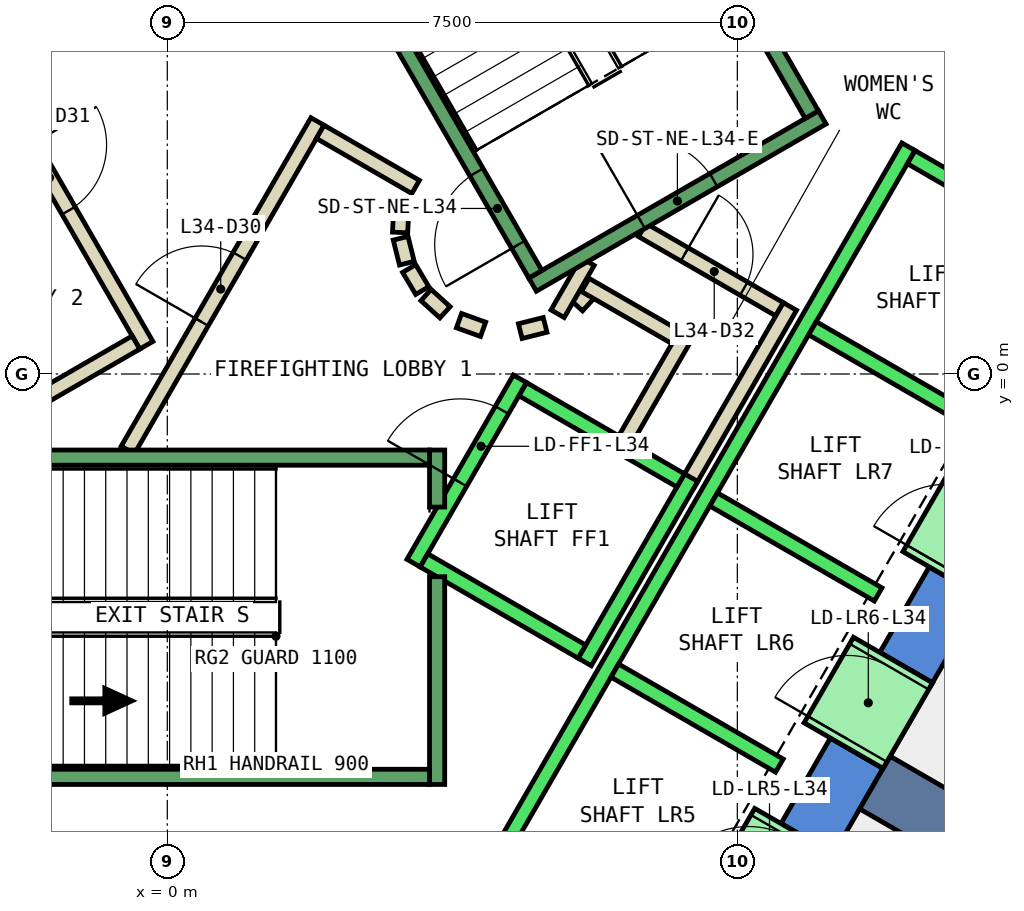
"""IFC4 building model, lengths in metres.
Left out: names, types, materials, properties, quantities, classifications, styles, units other than length and angle.
Written with IfcOpenShell. Run it as: python <this file> out.ifc"""

import sys

from ifc_helpers import new_model, si_unit, direction, frame, frame_2d, origin, place, context, subcontext, project, spatial, polyline, rectangle, outline, extrude, element, fill, save


model = new_model("IFC4")
c1 = context("Model", 3, precision=1e-05, world=origin(), true_north=direction((0.0, 1.0)))
c2 = subcontext(c1, "Body", "Model", "MODEL_VIEW")
j1 = project(units=[si_unit("LENGTHUNIT", "METRE"), si_unit("PLANEANGLEUNIT", "RADIAN")], contexts=[c1])
p1 = place(None, origin())
s1 = spatial("IfcSite", under=j1, at=p1, CompositionType="ELEMENT")
p2 = place(p1, origin())
s2 = spatial("IfcBuilding", under=s1, at=p2, CompositionType="ELEMENT")
p3 = place(p2, frame((0.0, 0.0, 155.0)))
s3 = spatial("IfcBuildingStorey", under=s2, at=p3, CompositionType="ELEMENT", Elevation=155.0)
p4 = place(p3, frame((0.0, 0.0, -0.4)))
e1 = element("IfcWall", 1, at=p4, inside=s3, PredefinedType="SHEAR", context=c2, shape_type="SweptSolid", body=[
    extrude(outline(polyline([(8.517, 11.748), (7.824, 11.348), (12.933, 2.5), (13.856, 2.5), (8.517, 11.748)])), origin(), (0.0, 0.0, 1.0), 4.2),
])
p5 = place(p3, frame((0.0, 0.0, -0.4)))
e2 = element("IfcWall", 2, at=p5, inside=s3, PredefinedType="SHEAR", context=c2, shape_type="SweptSolid", body=[
    extrude(outline(polyline([(9.417, -5.189), (8.724, -4.789), (8.075, -5.914), (8.767, -6.314), (9.417, -5.189)])), origin(), (0.0, 0.0, 1.0), 4.2),
])
p6 = place(p3, frame((0.0, 0.0, -0.4)))
e3 = element("IfcWall", 3, at=p6, inside=s3, PredefinedType="SHEAR", context=c2, shape_type="SweptSolid", body=[
    extrude(outline(polyline([(10.717, -2.937), (10.025, -2.537), (9.374, -3.663), (10.067, -4.063), (10.717, -2.937)])), origin(), (0.0, 0.0, 1.0), 4.2),
])
p7 = place(p3, frame((0.0, 0.0, 3.6)))
e4 = element("IfcWall", 4, at=p7, inside=s3, PredefinedType="SHEAR", context=c2, shape_type="SweptSolid", body=[
    extrude(outline(polyline([(8.767, -6.314), (8.075, -5.914), (7.424, -7.04), (8.117, -7.44), (8.767, -6.314)])), origin(), (0.0, 0.0, 1.0), 0.2),
])
p8 = place(p3, frame((0.0, 0.0, 3.6)))
e5 = element("IfcWall", 5, at=p8, inside=s3, PredefinedType="SHEAR", context=c2, shape_type="SweptSolid", body=[
    extrude(outline(polyline([(10.067, -4.063), (9.374, -3.663), (8.724, -4.789), (9.417, -5.189), (10.067, -4.063)])), origin(), (0.0, 0.0, 1.0), 0.2),
])
p9 = place(p3, frame((0.0, 0.0, 3.6)))
e6 = element("IfcWall", 6, at=p9, inside=s3, PredefinedType="SHEAR", context=c2, shape_type="SweptSolid", body=[
    extrude(outline(polyline([(11.367, -1.811), (10.675, -1.411), (10.025, -2.537), (10.717, -2.937), (11.367, -1.811)])), origin(), (0.0, 0.0, 1.0), 0.2),
])
p10 = place(p3, frame((9.31, -5.375, -0.4), z_axis=(0.0, 0.0, 1.0), x_axis=(0.866017533419, -0.500013631625, 0.0)))
e7 = element("IfcWall", 7, at=p10, inside=s3, PredefinedType="SHEAR", context=c2, shape_type="SweptSolid", body=[
    extrude(rectangle(XDim=9.0, YDim=0.8, at=frame_2d((4.5, 0.0))), origin(), (0.0, 0.0, 1.0), 4.2),
])
p11 = place(p3, frame((5.39, 0.898, 0.0), z_axis=(0.0, 0.0, 1.0), x_axis=(0.673828488714, 0.738887791073, 0.0)))
e8 = element("IfcWall", 8, at=p11, inside=s3, PredefinedType="PARTITIONING", context=c2, shape_type="SweptSolid", body=[
    extrude(rectangle(XDim=0.263, YDim=0.2, at=frame_2d((0.131, 0.0))), origin(), (0.0, 0.0, 1.0), 3.8),
])
p12 = place(p3, frame((5.499, 1.172, 0.0), z_axis=(0.0, 0.0, 1.0), x_axis=(0.866333505267, -0.499465972466, 0.0)))
e9 = element("IfcWall", 9, at=p12, inside=s3, PredefinedType="PARTITIONING", context=c2, shape_type="SweptSolid", body=[
    extrude(rectangle(XDim=1.374, YDim=0.2, at=frame_2d((0.687, 0.0))), origin(), (0.0, 0.0, 1.0), 3.8),
])
p13 = place(p3, frame((6.826, 0.522, 0.0), z_axis=(0.0, 0.0, 1.0), x_axis=(-0.500016722714, -0.866015748706, 0.0)))
e10 = element("IfcWall", 10, at=p13, inside=s3, PredefinedType="PARTITIONING", context=c2, shape_type="SweptSolid", body=[
    extrude(rectangle(XDim=1.7, YDim=0.2, at=frame_2d((0.85, 0.0))), origin(), (0.0, 0.0, 1.0), 3.8),
])
p14 = place(p3, frame((6.25, 1.894, 0.0), z_axis=(0.0, 0.0, 1.0), x_axis=(0.866043184279, -0.499969202016, 0.0)))
e11 = element("IfcWall", 11, at=p14, inside=s3, PredefinedType="PARTITIONING", context=c2, shape_type="SweptSolid", body=[
    extrude(rectangle(XDim=2.084, YDim=0.2, at=frame_2d((1.042, 0.0))), origin(), (0.0, 0.0, 1.0), 3.8),
])
p15 = place(p14, frame((0.642, 0.0, 0.0)))
e12 = element("IfcOpeningElement", 12, at=p15, cuts=e11, PredefinedType="OPENING", context=c2, shape_type="SweptSolid", body=[
    extrude(rectangle(XDim=0.9, YDim=2.1, at=frame_2d((0.45, 1.05))), frame((0.0, 0.11, 0.0), z_axis=(0.0, -1.0, 0.0), x_axis=(1.0, 0.0, 0.0)), (0.0, 0.0, 1.0), 0.22),
])
p16 = place(p3, frame((8.192, 0.888, 0.0), z_axis=(0.0, 0.0, 1.0), x_axis=(-0.499940625693, -0.866059680843, 0.0)))
e13 = element("IfcWall", 13, at=p16, inside=s3, PredefinedType="PARTITIONING", context=c2, shape_type="SweptSolid", body=[
    extrude(rectangle(XDim=2.68, YDim=0.2, at=frame_2d((1.34, 0.0))), origin(), (0.0, 0.0, 1.0), 3.8),
])
p17 = place(p3, frame((5.135, 0.793, 0.0), z_axis=(0.0, 0.0, 1.0), x_axis=(0.499526442893, 0.866298639529, 0.0)))
e14 = element("IfcWall", 14, at=p17, inside=s3, PredefinedType="PARTITIONING", context=c2, shape_type="SweptSolid", body=[
    extrude(rectangle(XDim=0.791, YDim=0.2, at=frame_2d((0.396, 0.0))), origin(), (0.0, 0.0, 1.0), 3.8),
])
p18 = place(p3, frame((-0.52, -1.0, 0.0), z_axis=(0.0, 0.0, 1.0), x_axis=(0.50011622646, 0.865958290007, 0.0)))
e15 = element("IfcWall", 15, at=p18, inside=s3, PredefinedType="PARTITIONING", context=c2, shape_type="SweptSolid", body=[
    extrude(rectangle(XDim=4.991, YDim=0.2, at=frame_2d((2.496, 0.0))), origin(), (0.0, 0.0, 1.0), 3.8),
])
p19 = place(p18, frame((1.945, 0.0, 0.0)))
e16 = element("IfcOpeningElement", 16, at=p19, cuts=e15, PredefinedType="OPENING", context=c2, shape_type="SweptSolid", body=[
    extrude(rectangle(XDim=1.0, YDim=2.1, at=frame_2d((0.5, 1.05))), frame((0.0, 0.11, 0.0), z_axis=(0.0, -1.0, 0.0), x_axis=(1.0, 0.0, 0.0)), (0.0, 0.0, 1.0), 0.22),
])
p20 = place(p3, frame((2.012, 3.186, 0.0), z_axis=(0.0, 0.0, 1.0), x_axis=(0.865891012941, -0.500232699559, 0.0)))
e17 = element("IfcWall", 17, at=p20, inside=s3, PredefinedType="PARTITIONING", context=c2, shape_type="SweptSolid", body=[
    extrude(rectangle(XDim=1.449, YDim=0.2, at=frame_2d((0.725, 0.0))), origin(), (0.0, 0.0, 1.0), 3.8),
])
p21 = place(p3, frame((3.079, 2.199, 0.0), z_axis=(0.0, 0.0, 1.0), x_axis=(-0.047771483479, -0.998858290933, 0.0)))
e18 = element("IfcWall", 18, at=p21, inside=s3, PredefinedType="PARTITIONING", context=c2, shape_type="SweptSolid", body=[
    extrude(rectangle(XDim=0.337, YDim=0.2, at=frame_2d((0.169, 0.0))), origin(), (0.0, 0.0, 1.0), 3.8),
])
p22 = place(p3, frame((3.07, 1.786, 0.0), z_axis=(0.0, 0.0, 1.0), x_axis=(0.242705583207, -0.970099994784, 0.0)))
e19 = element("IfcWall", 19, at=p22, inside=s3, PredefinedType="PARTITIONING", context=c2, shape_type="SweptSolid", body=[
    extrude(rectangle(XDim=0.338, YDim=0.2, at=frame_2d((0.169, 0.0))), origin(), (0.0, 0.0, 1.0), 3.8),
])
for number, where, z_axis, x_axis in (
    (20, (3.182, 1.388, 0.0), (0.0, 0.0, 1.0), (0.512, -0.859, 0.0)),
    (21, (3.404, 1.039, 0.0), (0.0, 0.0, 1.0), (0.74, -0.672, 0.0)),
):
    element("IfcWall", number, at=place(p3, frame(where, z_axis=z_axis, x_axis=x_axis)), inside=s3, PredefinedType="PARTITIONING", context=c2, shape_type="SweptSolid", body=[
        extrude(rectangle(XDim=0.338, YDim=0.2, at=frame_2d((0.169, 0.0))), origin(), (0.0, 0.0, 1.0), 3.8),
    ])
p23 = place(p3, frame((3.838, 0.702, 0.0), z_axis=(0.0, 0.0, 1.0), x_axis=(0.941035081519, -0.338308993895, 0.0)))
e22 = element("IfcWall", 22, at=p23, inside=s3, PredefinedType="PARTITIONING", context=c2, shape_type="SweptSolid", body=[
    extrude(rectangle(XDim=0.337, YDim=0.2, at=frame_2d((0.168, 0.0))), origin(), (0.0, 0.0, 1.0), 3.8),
])
p24 = place(p3, frame((4.644, 0.564, 0.0), z_axis=(0.0, 0.0, 1.0), x_axis=(0.969929076366, 0.243387729394, 0.0)))
e23 = element("IfcWall", 23, at=p24, inside=s3, PredefinedType="PARTITIONING", context=c2, shape_type="SweptSolid", body=[
    extrude(rectangle(XDim=0.337, YDim=0.2, at=frame_2d((0.168, 0.0))), origin(), (0.0, 0.0, 1.0), 3.8),
])
p25 = place(p3, frame((-2.771, 4.7, 0.0), z_axis=(0.0, 0.0, 1.0), x_axis=(0.499969479948, -0.866043023828, 0.0)))
e24 = element("IfcWall", 24, at=p25, inside=s3, PredefinedType="PARTITIONING", context=c2, shape_type="SweptSolid", body=[
    extrude(rectangle(XDim=4.99, YDim=0.2, at=frame_2d((2.495, 0.0))), origin(), (0.0, 0.0, 1.0), 3.8),
])
p26 = place(p25, frame((1.945, 0.0, 0.0)))
e25 = element("IfcOpeningElement", 25, at=p26, cuts=e24, PredefinedType="OPENING", context=c2, shape_type="SweptSolid", body=[
    extrude(rectangle(XDim=1.0, YDim=2.1, at=frame_2d((0.5, 1.05))), frame((0.0, 0.11, 0.0), z_axis=(0.0, -1.0, 0.0), x_axis=(1.0, 0.0, 0.0)), (0.0, 0.0, 1.0), 0.22),
])
p27 = place(p3, frame((-0.412, 0.414, 0.0), z_axis=(0.0, 0.0, 1.0), x_axis=(-0.866017369001, -0.500013916395, 0.0)))
e26 = element("IfcWall", 26, at=p27, inside=s3, PredefinedType="PARTITIONING", context=c2, shape_type="SweptSolid", body=[
    extrude(rectangle(XDim=1.45, YDim=0.2, at=frame_2d((0.725, 0.0))), origin(), (0.0, 0.0, 1.0), 3.8),
])
p28 = place(p3, frame((3.24, -2.488, 0.0), z_axis=(0.0, 0.0, 1.0), x_axis=(0.49994636267, 0.866056369097, 0.0)))
e27 = element("IfcWall", 27, at=p28, inside=s3, PredefinedType="STANDARD", context=c2, shape_type="SweptSolid", body=[
    extrude(rectangle(XDim=2.8, YDim=0.2, at=frame_2d((1.4, 0.0))), origin(), (0.0, 0.0, 1.0), 3.8),
])
p29 = place(p28, frame((1.225, 0.0, 0.0)))
e28 = element("IfcOpeningElement", 28, at=p29, cuts=e27, PredefinedType="OPENING", context=c2, shape_type="SweptSolid", body=[
    extrude(rectangle(XDim=1.1, YDim=2.1, at=frame_2d((0.55, 1.05))), frame((0.0, 0.11, 0.0), z_axis=(0.0, -1.0, 0.0), x_axis=(1.0, 0.0, 0.0)), (0.0, 0.0, 1.0), 0.22),
])
p30 = place(p3, frame((5.492, -3.788, 0.0), z_axis=(0.0, 0.0, 1.0), x_axis=(0.500011755427, 0.866018616679, 0.0)))
e29 = element("IfcWall", 29, at=p30, inside=s3, PredefinedType="STANDARD", context=c2, shape_type="SweptSolid", body=[
    extrude(rectangle(XDim=2.8, YDim=0.2, at=frame_2d((1.4, 0.0))), origin(), (0.0, 0.0, 1.0), 3.8),
])
p31 = place(p3, frame((3.377, -2.452, 0.0), z_axis=(0.0, 0.0, 1.0), x_axis=(0.865955154139, -0.50012165622, 0.0)))
e30 = element("IfcWall", 30, at=p31, inside=s3, PredefinedType="STANDARD", context=c2, shape_type="SweptSolid", body=[
    extrude(rectangle(XDim=2.4, YDim=0.2, at=frame_2d((1.2, 0.0))), origin(), (0.0, 0.0, 1.0), 3.8),
])
p32 = place(p3, frame((4.677, -0.2, 0.0), z_axis=(0.0, 0.0, 1.0), x_axis=(0.865973769406, -0.500089422704, 0.0)))
e31 = element("IfcWall", 31, at=p32, inside=s3, PredefinedType="STANDARD", context=c2, shape_type="SweptSolid", body=[
    extrude(rectangle(XDim=2.399, YDim=0.2, at=frame_2d((1.2, 0.0))), origin(), (0.0, 0.0, 1.0), 3.8),
])
p33 = place(p3, frame((4.451, -6.19, 0.0), z_axis=(0.0, 0.0, 1.0), x_axis=(0.50000090737, 0.866024879913, 0.0)))
e32 = element("IfcWall", 32, at=p33, inside=s3, PredefinedType="STANDARD", context=c2, shape_type="SweptSolid", body=[
    extrude(rectangle(XDim=10.6, YDim=0.2, at=frame_2d((5.3, 0.0))), origin(), (0.0, 0.0, 1.0), 3.8),
])
for number, where, z_axis, x_axis in (
    (33, (5.888, -3.902, 0.0), (0.0, 0.0, 1.0), (0.866, -0.5, 0.0)),
    (34, (7.188, -1.65, 0.0), (0.0, 0.0, 1.0), (0.866, -0.5, 0.0)),
    (35, (8.488, 0.602, 0.0), (0.0, 0.0, 1.0), (0.866, -0.5, 0.0)),
):
    element("IfcWall", number, at=place(p3, frame(where, z_axis=z_axis, x_axis=x_axis)), inside=s3, PredefinedType="STANDARD", context=c2, shape_type="SweptSolid", body=[
        extrude(rectangle(XDim=2.5, YDim=0.2, at=frame_2d((1.25, 0.0))), origin(), (0.0, 0.0, 1.0), 3.8),
    ])
p34 = place(p3, frame((9.788, 2.853, 0.0), z_axis=(0.0, 0.0, 1.0), x_axis=(0.865998541277, -0.500046524342, 0.0)))
e36 = element("IfcWall", 36, at=p34, inside=s3, PredefinedType="STANDARD", context=c2, shape_type="SweptSolid", body=[
    extrude(rectangle(XDim=2.5, YDim=0.2, at=frame_2d((1.25, 0.0))), origin(), (0.0, 0.0, 1.0), 3.8),
])
p35 = place(p3, frame((7.598, -7.14, 0.0), z_axis=(0.0, 0.0, 1.0), x_axis=(0.500362116554, 0.865816234728, 0.0)))
e37 = element("IfcWall", 37, at=p35, inside=s3, PredefinedType="STANDARD", context=c2, shape_type="SweptSolid", body=[
    extrude(rectangle(XDim=1.299, YDim=1.2, at=frame_2d((0.65, 0.0))), origin(), (0.0, 0.0, 1.0), 2.4),
])
p36 = place(p35, frame((0.1, 0.0, 0.0)))
e38 = element("IfcOpeningElement", 38, at=p36, cuts=e37, PredefinedType="OPENING", context=c2, shape_type="SweptSolid", body=[
    extrude(rectangle(XDim=1.1, YDim=2.3, at=frame_2d((0.55, 1.15))), frame((0.0, 0.61, 0.0), z_axis=(0.0, -1.0, 0.0), x_axis=(1.0, 0.0, 0.0)), (0.0, 0.0, 1.0), 1.22),
])
p37 = place(p3, frame((8.898, -4.889, 0.0), z_axis=(0.0, 0.0, 1.0), x_axis=(0.500036693733, 0.866004217611, 0.0)))
e39 = element("IfcWall", 39, at=p37, inside=s3, PredefinedType="STANDARD", context=c2, shape_type="SweptSolid", body=[
    extrude(rectangle(XDim=1.3, YDim=1.2, at=frame_2d((0.65, 0.0))), origin(), (0.0, 0.0, 1.0), 2.4),
])
p38 = place(p37, frame((0.1, 0.0, 0.0)))
e40 = element("IfcOpeningElement", 40, at=p38, cuts=e39, PredefinedType="OPENING", context=c2, shape_type="SweptSolid", body=[
    extrude(rectangle(XDim=1.1, YDim=2.3, at=frame_2d((0.55, 1.15))), frame((0.0, 0.61, 0.0), z_axis=(0.0, -1.0, 0.0), x_axis=(1.0, 0.0, 0.0)), (0.0, 0.0, 1.0), 1.22),
])
p39 = place(p3, frame((10.198, -2.637, 0.0), z_axis=(0.0, 0.0, 1.0), x_axis=(0.49989585183, 0.866085525409, 0.0)))
e41 = element("IfcWall", 41, at=p39, inside=s3, PredefinedType="STANDARD", context=c2, shape_type="SweptSolid", body=[
    extrude(rectangle(XDim=1.3, YDim=1.2, at=frame_2d((0.65, 0.0))), origin(), (0.0, 0.0, 1.0), 2.4),
])
p40 = place(p39, frame((0.1, 0.0, 0.0)))
e42 = element("IfcOpeningElement", 42, at=p40, cuts=e41, PredefinedType="OPENING", context=c2, shape_type="SweptSolid", body=[
    extrude(rectangle(XDim=1.1, YDim=2.3, at=frame_2d((0.55, 1.15))), frame((0.0, 0.61, 0.0), z_axis=(0.0, -1.0, 0.0), x_axis=(1.0, 0.0, 0.0)), (0.0, 0.0, 1.0), 1.22),
])
p41 = place(p3, frame((3.55, -2.667, 0.0), z_axis=(0.0, 0.0, 1.0), x_axis=(0.0, -1.0, 0.0)))
e43 = element("IfcWall", 43, at=p41, inside=s3, PredefinedType="STANDARD", context=c2, shape_type="SweptSolid", body=[
    extrude(rectangle(XDim=2.733, YDim=0.2, at=frame_2d((1.366, 0.0))), origin(), (0.0, 0.0, 1.0), 3.8),
])
p42 = place(p3, frame((3.55, -1.0, 0.0), z_axis=(0.0, 0.0, 1.0), x_axis=(0.0, -1.0, 0.0)))
e44 = element("IfcWall", 44, at=p42, inside=s3, PredefinedType="STANDARD", context=c2, shape_type="SweptSolid", body=[
    extrude(rectangle(XDim=0.751, YDim=0.2, at=frame_2d((0.375, 0.0))), origin(), (0.0, 0.0, 1.0), 3.8),
])
p43 = place(p3, frame((-3.45, -1.1, 0.0), z_axis=(0.0, 0.0, 1.0), x_axis=(1.0, 0.0, 0.0)))
e45 = element("IfcWall", 45, at=p43, inside=s3, PredefinedType="STANDARD", context=c2, shape_type="SweptSolid", body=[
    extrude(rectangle(XDim=6.9, YDim=0.2, at=frame_2d((3.45, 0.0))), origin(), (0.0, 0.0, 1.0), 3.8),
])
p44 = place(p43, frame((0.45, 0.0, 0.0)))
e46 = element("IfcOpeningElement", 46, at=p44, cuts=e45, PredefinedType="OPENING", context=c2, shape_type="SweptSolid", body=[
    extrude(rectangle(XDim=1.1, YDim=2.2, at=frame_2d((0.55, 1.1))), frame((0.0, 0.11, 0.0), z_axis=(0.0, -1.0, 0.0), x_axis=(1.0, 0.0, 0.0)), (0.0, 0.0, 1.0), 0.22),
])
p45 = place(p3, frame((-3.45, -5.3, 0.0), z_axis=(0.0, 0.0, 1.0), x_axis=(1.0, 0.0, 0.0)))
e47 = element("IfcWall", 47, at=p45, inside=s3, PredefinedType="STANDARD", context=c2, shape_type="SweptSolid", body=[
    extrude(rectangle(XDim=6.9, YDim=0.2, at=frame_2d((3.45, 0.0))), origin(), (0.0, 0.0, 1.0), 3.8),
])
p46 = place(p3, frame((4.806, 1.176, 0.0), z_axis=(0.0, 0.0, 1.0), x_axis=(0.866059941101, 0.499940174841, 0.0)))
e48 = element("IfcWall", 48, at=p46, inside=s3, PredefinedType="STANDARD", context=c2, shape_type="SweptSolid", body=[
    extrude(rectangle(XDim=4.4, YDim=0.2, at=frame_2d((2.2, 0.0))), origin(), (0.0, 0.0, 1.0), 3.8),
])
p47 = place(p46, frame((1.65, 0.0, 0.0)))
e49 = element("IfcOpeningElement", 49, at=p47, cuts=e48, PredefinedType="OPENING", context=c2, shape_type="SweptSolid", body=[
    extrude(rectangle(XDim=1.1, YDim=2.2, at=frame_2d((0.55, 1.1))), frame((0.0, 0.11, 0.0), z_axis=(0.0, -1.0, 0.0), x_axis=(1.0, 0.0, 0.0)), (0.0, 0.0, 1.0), 0.22),
])
p48 = place(p3, frame((4.843, 1.312, 0.0), z_axis=(0.0, 0.0, 1.0), x_axis=(-0.499963383562, 0.866046543262, 0.0)))
e50 = element("IfcWall", 50, at=p48, inside=s3, PredefinedType="STANDARD", context=c2, shape_type="SweptSolid", body=[
    extrude(rectangle(XDim=6.9, YDim=0.2, at=frame_2d((3.45, 0.0))), origin(), (0.0, 0.0, 1.0), 3.8),
])
p49 = place(p48, frame((0.45, 0.0, 0.0)))
e51 = element("IfcOpeningElement", 51, at=p49, cuts=e50, PredefinedType="OPENING", context=c2, shape_type="SweptSolid", body=[
    extrude(rectangle(XDim=1.1, YDim=2.2, at=frame_2d((0.55, 1.1))), frame((0.0, 0.11, 0.0), z_axis=(0.0, -1.0, 0.0), x_axis=(1.0, 0.0, 0.0)), (0.0, 0.0, 1.0), 0.22),
])
p50 = place(p3, frame((8.48, 3.412, 0.0), z_axis=(0.0, 0.0, 1.0), x_axis=(-0.499978703459, 0.866037698999, 0.0)))
e52 = element("IfcWall", 52, at=p50, inside=s3, PredefinedType="STANDARD", context=c2, shape_type="SweptSolid", body=[
    extrude(rectangle(XDim=6.9, YDim=0.2, at=frame_2d((3.45, 0.0))), origin(), (0.0, 0.0, 1.0), 3.8),
])
p51 = place(p3, frame((-1.393, 7.288, 0.0), z_axis=(0.0, 0.0, 1.0), x_axis=(-0.499963383562, -0.866046543262, 0.0)))
e53 = element("IfcWall", 53, at=p51, inside=s3, PredefinedType="STANDARD", context=c2, shape_type="SweptSolid", body=[
    extrude(rectangle(XDim=6.9, YDim=0.2, at=frame_2d((3.45, 0.0))), origin(), (0.0, 0.0, 1.0), 3.8),
])
p52 = place(p51, frame((0.45, 0.0, 0.0)))
e54 = element("IfcOpeningElement", 54, at=p52, cuts=e53, PredefinedType="OPENING", context=c2, shape_type="SweptSolid", body=[
    extrude(rectangle(XDim=1.1, YDim=2.2, at=frame_2d((0.55, 1.1))), frame((0.0, 0.11, 0.0), z_axis=(0.0, -1.0, 0.0), x_axis=(1.0, 0.0, 0.0)), (0.0, 0.0, 1.0), 0.22),
])
p53 = place(p19, origin())
e55 = element("IfcDoor", 55, at=p53, inside=s3, OperationType="SINGLE_SWING_LEFT", PredefinedType="DOOR", context=c2, shape_type="SweptSolid", body=[
    extrude(rectangle(XDim=1.0, YDim=2.1, at=frame_2d((0.5, 1.05))), frame((0.0, 0.025, 0.0), z_axis=(0.0, -1.0, 0.0), x_axis=(1.0, 0.0, 0.0)), (0.0, 0.0, 1.0), 0.05),
])
fill(e16, e55)
p54 = place(p26, origin())
e56 = element("IfcDoor", 56, at=p54, inside=s3, OperationType="SINGLE_SWING_RIGHT", PredefinedType="DOOR", context=c2, shape_type="SweptSolid", body=[
    extrude(rectangle(XDim=1.0, YDim=2.1, at=frame_2d((0.5, 1.05))), frame((0.0, 0.025, 0.0), z_axis=(0.0, -1.0, 0.0), x_axis=(1.0, 0.0, 0.0)), (0.0, 0.0, 1.0), 0.05),
])
fill(e25, e56)
p55 = place(p15, origin())
e57 = element("IfcDoor", 57, at=p55, inside=s3, OperationType="SINGLE_SWING_LEFT", PredefinedType="DOOR", context=c2, shape_type="SweptSolid", body=[
    extrude(rectangle(XDim=0.9, YDim=2.1, at=frame_2d((0.45, 1.05))), frame((0.0, 0.025, 0.0), z_axis=(0.0, -1.0, 0.0), x_axis=(1.0, 0.0, 0.0)), (0.0, 0.0, 1.0), 0.05),
])
fill(e12, e57)
p56 = place(p38, origin())
e58 = element("IfcDoor", 58, at=p56, inside=s3, OperationType="SLIDING_TO_LEFT", PredefinedType="DOOR", context=c2, shape_type="SweptSolid", body=[
    extrude(rectangle(XDim=1.1, YDim=2.3, at=frame_2d((0.55, 1.15))), frame((0.0, 0.025, 0.0), z_axis=(0.0, -1.0, 0.0), x_axis=(1.0, 0.0, 0.0)), (0.0, 0.0, 1.0), 0.05),
])
fill(e40, e58)
p57 = place(p29, origin())
e59 = element("IfcDoor", 59, at=p57, inside=s3, OperationType="SLIDING_TO_LEFT", PredefinedType="DOOR", context=c2, shape_type="SweptSolid", body=[
    extrude(rectangle(XDim=1.1, YDim=2.1, at=frame_2d((0.55, 1.05))), frame((0.0, 0.025, 0.0), z_axis=(0.0, -1.0, 0.0), x_axis=(1.0, 0.0, 0.0)), (0.0, 0.0, 1.0), 0.05),
])
fill(e28, e59)
p58 = place(p49, origin())
e60 = element("IfcDoor", 60, at=p58, inside=s3, OperationType="SINGLE_SWING_LEFT", PredefinedType="DOOR", context=c2, shape_type="SweptSolid", body=[
    extrude(rectangle(XDim=1.1, YDim=2.2, at=frame_2d((0.55, 1.1))), frame((0.0, 0.025, 0.0), z_axis=(0.0, -1.0, 0.0), x_axis=(1.0, 0.0, 0.0)), (0.0, 0.0, 1.0), 0.05),
])
fill(e51, e60)
p59 = place(p47, origin())
e61 = element("IfcDoor", 61, at=p59, inside=s3, OperationType="SINGLE_SWING_LEFT", PredefinedType="DOOR", context=c2, shape_type="SweptSolid", body=[
    extrude(rectangle(XDim=1.1, YDim=2.2, at=frame_2d((0.55, 1.1))), frame((0.0, 0.025, 0.0), z_axis=(0.0, -1.0, 0.0), x_axis=(1.0, 0.0, 0.0)), (0.0, 0.0, 1.0), 0.05),
])
fill(e49, e61)
save(model, sys.argv[1])
